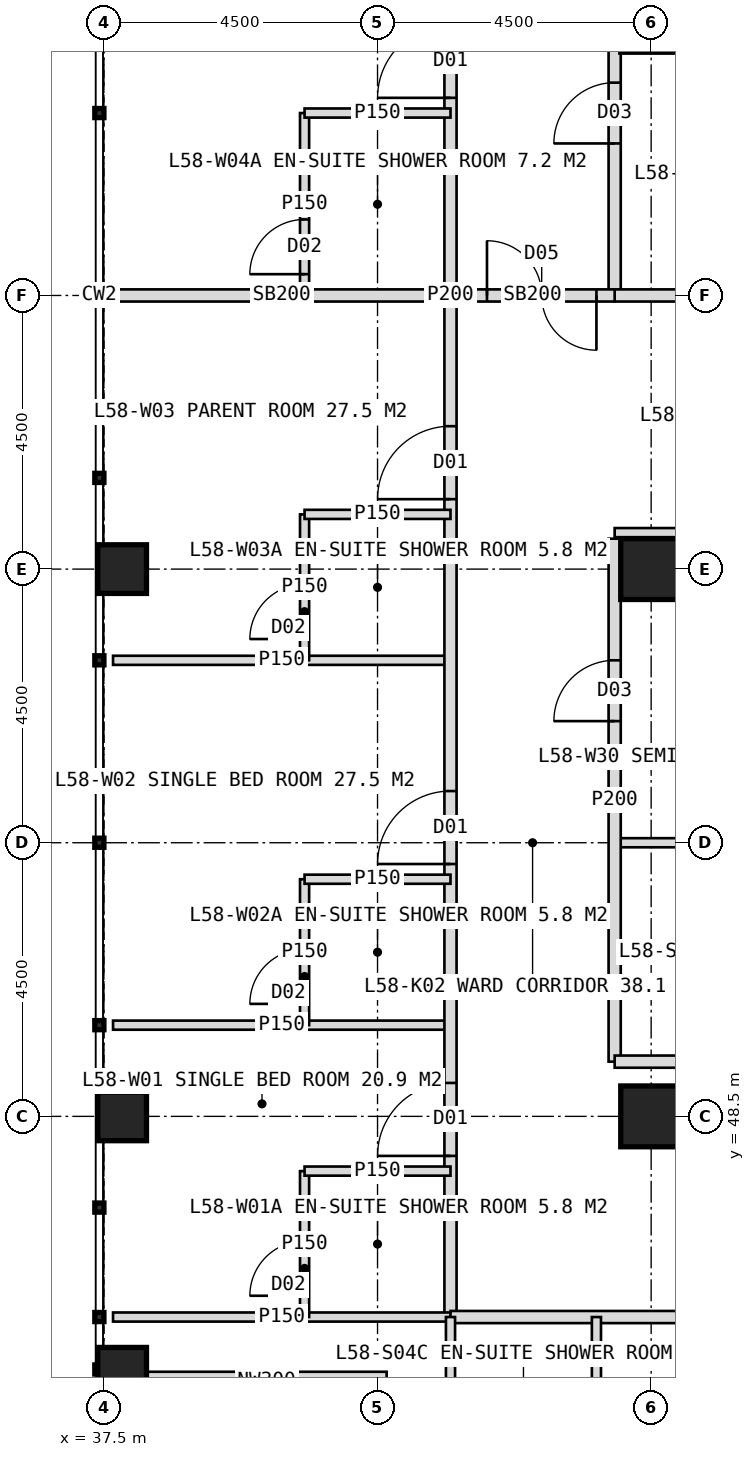
"""IFC4 building model, lengths in metres.
Left out: names, types, materials, properties, quantities, classifications, styles, units other than length and angle.
Written with IfcOpenShell. Run it as: python <this file> out.ifc"""

import sys

from ifc_helpers import new_model, si_unit, direction, frame, frame_2d, origin, origin_2d, place, context, subcontext, project, spatial, rectangle, hollow_rectangle, extrude, element, fill, save


model = new_model("IFC4")
c1 = context("Model", 3, precision=1e-05, world=origin(), true_north=direction((0.0, 1.0)))
c2 = subcontext(c1, "Body", "Model", "MODEL_VIEW")
j1 = project(units=[si_unit("LENGTHUNIT", "METRE"), si_unit("PLANEANGLEUNIT", "RADIAN")], contexts=[c1])
p1 = place(None, origin())
s1 = spatial("IfcSite", under=j1, at=p1, CompositionType="ELEMENT")
p2 = place(p1, origin())
s2 = spatial("IfcBuilding", under=s1, at=p2, CompositionType="ELEMENT")
p3 = place(p2, frame((0.0, 0.0, 241.0)))
s3 = spatial("IfcBuildingStorey", under=s2, at=p3, CompositionType="ELEMENT", Elevation=241.0)
for number, where, z_axis, x_axis in (
    (1, (46.5, 48.5, 0.0), (0.0, 0.0, 1.0), (1.0, 0.0, 0.0)),
    (2, (46.5, 57.5, 0.0), (0.0, 0.0, 1.0), (1.0, 0.0, 0.0)),
):
    element("IfcColumn", number, at=place(p3, frame(where, z_axis=z_axis, x_axis=x_axis)), inside=s3, PredefinedType="COLUMN", context=c2, shape_type="SweptSolid", body=[
        extrude(hollow_rectangle(XDim=1.0, YDim=1.0, WallThickness=0.1, at=origin_2d()), origin(), (0.0, 0.0, 1.0), 4.0),
    ])
for number, where, z_axis, x_axis in (
    (3, (37.8, 44.3, 0.0), (0.0, 0.0, 1.0), (1.0, 0.0, 0.0)),
    (4, (37.8, 48.5, 0.0), (0.0, 0.0, 1.0), (1.0, 0.0, 0.0)),
    (5, (37.8, 57.5, 0.0), (0.0, 0.0, 1.0), (1.0, 0.0, 0.0)),
):
    element("IfcColumn", number, at=place(p3, frame(where, z_axis=z_axis, x_axis=x_axis)), inside=s3, PredefinedType="COLUMN", context=c2, shape_type="SweptSolid", body=[
        extrude(hollow_rectangle(XDim=0.8, YDim=0.8, WallThickness=0.08, at=origin_2d()), origin(), (0.0, 0.0, 1.0), 4.0),
    ])
p4 = place(p3, frame((42.15, 44.15, 0.0), z_axis=(0.0, 0.0, 1.0), x_axis=(-1.0, 0.0, 0.0)))
e6 = element("IfcWall", 6, at=p4, inside=s3, PredefinedType="ELEMENTEDWALL", context=c2, shape_type="SweptSolid", body=[
    extrude(rectangle(XDim=3.95, YDim=0.3, at=frame_2d((1.975, 0.0))), origin(), (0.0, 0.0, 1.0), 2.95),
])
for number, where, z_axis, x_axis in (
    (7, (43.2, 50.0, 0.0), (0.0, 0.0, 1.0), (-1.0, 0.0, 0.0)),
    (8, (43.2, 56.0, 0.0), (0.0, 0.0, 1.0), (-1.0, 0.0, 0.0)),
):
    element("IfcWall", number, at=place(p3, frame(where, z_axis=z_axis, x_axis=x_axis)), inside=s3, PredefinedType="PARTITIONING", context=c2, shape_type="SweptSolid", body=[
        extrude(rectangle(XDim=5.55, YDim=0.15, at=frame_2d((2.775, 0.0))), origin(), (0.0, 0.0, 1.0), 3.75),
    ])
p5 = place(p3, frame((43.2, 62.0, 0.0), z_axis=(0.0, 0.0, 1.0), x_axis=(-1.0, 0.0, 0.0)))
e9 = element("IfcWall", 9, at=p5, inside=s3, PredefinedType="SOLIDWALL", context=c2, shape_type="SweptSolid", body=[
    extrude(rectangle(XDim=5.55, YDim=0.2, at=frame_2d((2.775, 0.0))), origin(), (0.0, 0.0, 1.0), 2.95),
])
p6 = place(p3, frame((43.2, 45.2, 0.0), z_axis=(0.0, 0.0, 1.0), x_axis=(0.0, 1.0, 0.0)))
e10 = element("IfcWall", 10, at=p6, inside=s3, PredefinedType="PARTITIONING", context=c2, shape_type="SweptSolid", body=[
    extrude(rectangle(XDim=33.6, YDim=0.2, at=frame_2d((16.8, 0.0))), origin(), (0.0, 0.0, 1.0), 3.75),
])
p7 = place(p6, frame((2.65, 0.0, 0.0)))
e11 = element("IfcOpeningElement", 11, at=p7, cuts=e10, PredefinedType="OPENING", context=c2, shape_type="SweptSolid", body=[
    extrude(rectangle(XDim=1.2, YDim=2.2, at=frame_2d((0.6, 1.1))), frame((0.0, 0.11, 0.0), z_axis=(0.0, -1.0, 0.0), x_axis=(1.0, 0.0, 0.0)), (0.0, 0.0, 1.0), 0.22),
])
p8 = place(p6, frame((7.45, 0.0, 0.0)))
e12 = element("IfcOpeningElement", 12, at=p8, cuts=e10, PredefinedType="OPENING", context=c2, shape_type="SweptSolid", body=[
    extrude(rectangle(XDim=1.2, YDim=2.2, at=frame_2d((0.6, 1.1))), frame((0.0, 0.11, 0.0), z_axis=(0.0, -1.0, 0.0), x_axis=(1.0, 0.0, 0.0)), (0.0, 0.0, 1.0), 0.22),
])
p9 = place(p6, frame((13.45, 0.0, 0.0)))
e13 = element("IfcOpeningElement", 13, at=p9, cuts=e10, PredefinedType="OPENING", context=c2, shape_type="SweptSolid", body=[
    extrude(rectangle(XDim=1.2, YDim=2.2, at=frame_2d((0.6, 1.1))), frame((0.0, 0.11, 0.0), z_axis=(0.0, -1.0, 0.0), x_axis=(1.0, 0.0, 0.0)), (0.0, 0.0, 1.0), 0.22),
])
p10 = place(p6, frame((20.05, 0.0, 0.0)))
e14 = element("IfcOpeningElement", 14, at=p10, cuts=e10, PredefinedType="OPENING", context=c2, shape_type="SweptSolid", body=[
    extrude(rectangle(XDim=1.2, YDim=2.2, at=frame_2d((0.6, 1.1))), frame((0.0, 0.11, 0.0), z_axis=(0.0, -1.0, 0.0), x_axis=(1.0, 0.0, 0.0)), (0.0, 0.0, 1.0), 0.22),
])
p11 = place(p6, frame((29.05, 0.0, 0.0)))
e15 = element("IfcOpeningElement", 15, at=p11, cuts=e10, PredefinedType="OPENING", context=c2, shape_type="SweptSolid", body=[
    extrude(rectangle(XDim=1.2, YDim=2.2, at=frame_2d((0.6, 1.1))), frame((0.0, 0.11, 0.0), z_axis=(0.0, -1.0, 0.0), x_axis=(1.0, 0.0, 0.0)), (0.0, 0.0, 1.0), 0.22),
])
p12 = place(p3, frame((43.2, 45.2, 0.0), z_axis=(0.0, 0.0, 1.0), x_axis=(-1.0, 0.0, 0.0)))
e16 = element("IfcWall", 16, at=p12, inside=s3, PredefinedType="PARTITIONING", context=c2, shape_type="SweptSolid", body=[
    extrude(rectangle(XDim=5.55, YDim=0.15, at=frame_2d((2.775, 0.0))), origin(), (0.0, 0.0, 1.0), 3.75),
])
p13 = place(p3, frame((40.8, 45.2, 0.0), z_axis=(0.0, 0.0, 1.0), x_axis=(0.0, 1.0, 0.0)))
e17 = element("IfcWall", 17, at=p13, inside=s3, PredefinedType="PARTITIONING", context=c2, shape_type="SweptSolid", body=[
    extrude(rectangle(XDim=2.4, YDim=0.15, at=frame_2d((1.2, 0.0))), origin(), (0.0, 0.0, 1.0), 3.75),
])
p14 = place(p13, frame((0.35, 0.0, 0.0)))
e18 = element("IfcOpeningElement", 18, at=p14, cuts=e17, PredefinedType="OPENING", context=c2, shape_type="SweptSolid", body=[
    extrude(rectangle(XDim=0.9, YDim=2.1, at=frame_2d((0.45, 1.05))), frame((0.0, 0.085, 0.0), z_axis=(0.0, -1.0, 0.0), x_axis=(1.0, 0.0, 0.0)), (0.0, 0.0, 1.0), 0.17),
])
p15 = place(p3, frame((43.2, 47.6, 0.0), z_axis=(0.0, 0.0, 1.0), x_axis=(-1.0, 0.0, 0.0)))
e19 = element("IfcWall", 19, at=p15, inside=s3, PredefinedType="PARTITIONING", context=c2, shape_type="SweptSolid", body=[
    extrude(rectangle(XDim=2.4, YDim=0.15, at=frame_2d((1.2, 0.0))), origin(), (0.0, 0.0, 1.0), 3.75),
])
p16 = place(p3, frame((40.8, 50.0, 0.0), z_axis=(0.0, 0.0, 1.0), x_axis=(0.0, 1.0, 0.0)))
e20 = element("IfcWall", 20, at=p16, inside=s3, PredefinedType="PARTITIONING", context=c2, shape_type="SweptSolid", body=[
    extrude(rectangle(XDim=2.4, YDim=0.15, at=frame_2d((1.2, 0.0))), origin(), (0.0, 0.0, 1.0), 3.75),
])
p17 = place(p16, frame((0.35, 0.0, 0.0)))
e21 = element("IfcOpeningElement", 21, at=p17, cuts=e20, PredefinedType="OPENING", context=c2, shape_type="SweptSolid", body=[
    extrude(rectangle(XDim=0.9, YDim=2.1, at=frame_2d((0.45, 1.05))), frame((0.0, 0.085, 0.0), z_axis=(0.0, -1.0, 0.0), x_axis=(1.0, 0.0, 0.0)), (0.0, 0.0, 1.0), 0.17),
])
p18 = place(p3, frame((43.2, 52.4, 0.0), z_axis=(0.0, 0.0, 1.0), x_axis=(-1.0, 0.0, 0.0)))
e22 = element("IfcWall", 22, at=p18, inside=s3, PredefinedType="PARTITIONING", context=c2, shape_type="SweptSolid", body=[
    extrude(rectangle(XDim=2.4, YDim=0.15, at=frame_2d((1.2, 0.0))), origin(), (0.0, 0.0, 1.0), 3.75),
])
p19 = place(p3, frame((40.8, 56.0, 0.0), z_axis=(0.0, 0.0, 1.0), x_axis=(0.0, 1.0, 0.0)))
e23 = element("IfcWall", 23, at=p19, inside=s3, PredefinedType="PARTITIONING", context=c2, shape_type="SweptSolid", body=[
    extrude(rectangle(XDim=2.4, YDim=0.15, at=frame_2d((1.2, 0.0))), origin(), (0.0, 0.0, 1.0), 3.75),
])
p20 = place(p19, frame((0.35, 0.0, 0.0)))
e24 = element("IfcOpeningElement", 24, at=p20, cuts=e23, PredefinedType="OPENING", context=c2, shape_type="SweptSolid", body=[
    extrude(rectangle(XDim=0.9, YDim=2.1, at=frame_2d((0.45, 1.05))), frame((0.0, 0.085, 0.0), z_axis=(0.0, -1.0, 0.0), x_axis=(1.0, 0.0, 0.0)), (0.0, 0.0, 1.0), 0.17),
])
p21 = place(p3, frame((43.2, 58.4, 0.0), z_axis=(0.0, 0.0, 1.0), x_axis=(-1.0, 0.0, 0.0)))
e25 = element("IfcWall", 25, at=p21, inside=s3, PredefinedType="PARTITIONING", context=c2, shape_type="SweptSolid", body=[
    extrude(rectangle(XDim=2.4, YDim=0.15, at=frame_2d((1.2, 0.0))), origin(), (0.0, 0.0, 1.0), 3.75),
])
p22 = place(p3, frame((40.8, 62.0, 0.0), z_axis=(0.0, 0.0, 1.0), x_axis=(0.0, 1.0, 0.0)))
e26 = element("IfcWall", 26, at=p22, inside=s3, PredefinedType="PARTITIONING", context=c2, shape_type="SweptSolid", body=[
    extrude(rectangle(XDim=3.0, YDim=0.15, at=frame_2d((1.5, 0.0))), origin(), (0.0, 0.0, 1.0), 3.75),
])
p23 = place(p22, frame((0.35, 0.0, 0.0)))
e27 = element("IfcOpeningElement", 27, at=p23, cuts=e26, PredefinedType="OPENING", context=c2, shape_type="SweptSolid", body=[
    extrude(rectangle(XDim=0.9, YDim=2.1, at=frame_2d((0.45, 1.05))), frame((0.0, 0.085, 0.0), z_axis=(0.0, -1.0, 0.0), x_axis=(1.0, 0.0, 0.0)), (0.0, 0.0, 1.0), 0.17),
])
p24 = place(p3, frame((43.2, 65.0, 0.0), z_axis=(0.0, 0.0, 1.0), x_axis=(-1.0, 0.0, 0.0)))
e28 = element("IfcWall", 28, at=p24, inside=s3, PredefinedType="PARTITIONING", context=c2, shape_type="SweptSolid", body=[
    extrude(rectangle(XDim=2.4, YDim=0.15, at=frame_2d((1.2, 0.0))), origin(), (0.0, 0.0, 1.0), 3.75),
])
p25 = place(p3, frame((51.0, 53.0, 0.0), z_axis=(0.0, 0.0, 1.0), x_axis=(-1.0, 0.0, 0.0)))
e29 = element("IfcWall", 29, at=p25, inside=s3, PredefinedType="PARTITIONING", context=c2, shape_type="SweptSolid", body=[
    extrude(rectangle(XDim=5.1, YDim=0.15, at=frame_2d((2.55, 0.0))), origin(), (0.0, 0.0, 1.0), 3.75),
])
p26 = place(p3, frame((45.9, 49.4, 0.0), z_axis=(0.0, 0.0, 1.0), x_axis=(0.0, 1.0, 0.0)))
e30 = element("IfcWall", 30, at=p26, inside=s3, PredefinedType="PARTITIONING", context=c2, shape_type="SweptSolid", body=[
    extrude(rectangle(XDim=8.6, YDim=0.2, at=frame_2d((4.3, 0.0))), origin(), (0.0, 0.0, 1.0), 3.75),
])
p27 = place(p26, frame((5.6, 0.0, 0.0)))
e31 = element("IfcOpeningElement", 31, at=p27, cuts=e30, PredefinedType="OPENING", context=c2, shape_type="SweptSolid", body=[
    extrude(rectangle(XDim=1.0, YDim=2.1, at=frame_2d((0.5, 1.05))), frame((0.0, 0.11, 0.0), z_axis=(0.0, -1.0, 0.0), x_axis=(1.0, 0.0, 0.0)), (0.0, 0.0, 1.0), 0.22),
])
p28 = place(p3, frame((45.9, 62.0, 0.0), z_axis=(0.0, 0.0, 1.0), x_axis=(0.0, 1.0, 0.0)))
e32 = element("IfcWall", 32, at=p28, inside=s3, PredefinedType="PARTITIONING", context=c2, shape_type="SweptSolid", body=[
    extrude(rectangle(XDim=14.1, YDim=0.2, at=frame_2d((7.05, 0.0))), origin(), (0.0, 0.0, 1.0), 3.75),
])
p29 = place(p28, frame((2.5, 0.0, 0.0)))
e33 = element("IfcOpeningElement", 33, at=p29, cuts=e32, PredefinedType="OPENING", context=c2, shape_type="SweptSolid", body=[
    extrude(rectangle(XDim=1.0, YDim=2.1, at=frame_2d((0.5, 1.05))), frame((0.0, 0.11, 0.0), z_axis=(0.0, -1.0, 0.0), x_axis=(1.0, 0.0, 0.0)), (0.0, 0.0, 1.0), 0.22),
])
p30 = place(p28, frame((7.0, 0.0, 0.0)))
e34 = element("IfcOpeningElement", 34, at=p30, cuts=e32, PredefinedType="OPENING", context=c2, shape_type="SweptSolid", body=[
    extrude(rectangle(XDim=1.0, YDim=2.1, at=frame_2d((0.5, 1.05))), frame((0.0, 0.11, 0.0), z_axis=(0.0, -1.0, 0.0), x_axis=(1.0, 0.0, 0.0)), (0.0, 0.0, 1.0), 0.22),
])
p31 = place(p28, frame((11.05, 0.0, 0.0)))
e35 = element("IfcOpeningElement", 35, at=p31, cuts=e32, PredefinedType="OPENING", context=c2, shape_type="SweptSolid", body=[
    extrude(rectangle(XDim=1.0, YDim=2.1, at=frame_2d((0.5, 1.05))), frame((0.0, 0.11, 0.0), z_axis=(0.0, -1.0, 0.0), x_axis=(1.0, 0.0, 0.0)), (0.0, 0.0, 1.0), 0.22),
])
p32 = place(p3, frame((51.0, 58.1, 0.0), z_axis=(0.0, 0.0, 1.0), x_axis=(-1.0, 0.0, 0.0)))
e36 = element("IfcWall", 36, at=p32, inside=s3, PredefinedType="PARTITIONING", context=c2, shape_type="SweptSolid", body=[
    extrude(rectangle(XDim=5.1, YDim=0.15, at=frame_2d((2.55, 0.0))), origin(), (0.0, 0.0, 1.0), 3.75),
])
p33 = place(p32, frame((0.6, 0.0, 0.0)))
e37 = element("IfcOpeningElement", 37, at=p33, cuts=e36, PredefinedType="OPENING", context=c2, shape_type="SweptSolid", body=[
    extrude(rectangle(XDim=0.9, YDim=2.1, at=frame_2d((0.45, 1.05))), frame((0.0, 0.085, 0.0), z_axis=(0.0, -1.0, 0.0), x_axis=(1.0, 0.0, 0.0)), (0.0, 0.0, 1.0), 0.17),
])
p34 = place(p3, frame((51.0, 62.0, 0.0), z_axis=(0.0, 0.0, 1.0), x_axis=(-1.0, 0.0, 0.0)))
e38 = element("IfcWall", 38, at=p34, inside=s3, PredefinedType="SOLIDWALL", context=c2, shape_type="SweptSolid", body=[
    extrude(rectangle(XDim=5.1, YDim=0.2, at=frame_2d((2.55, 0.0))), origin(), (0.0, 0.0, 1.0), 2.95),
])
p35 = place(p3, frame((76.8, 45.2, 0.0), z_axis=(0.0, 0.0, 1.0), x_axis=(-1.0, 0.0, 0.0)))
e39 = element("IfcWall", 39, at=p35, inside=s3, PredefinedType="PARTITIONING", context=c2, shape_type="SweptSolid", body=[
    extrude(rectangle(XDim=33.6, YDim=0.2, at=frame_2d((16.8, 0.0))), origin(), (0.0, 0.0, 1.0), 3.75),
])
p36 = place(p35, frame((3.25, 0.0, 0.0)))
e40 = element("IfcOpeningElement", 40, at=p36, cuts=e39, PredefinedType="OPENING", context=c2, shape_type="SweptSolid", body=[
    extrude(rectangle(XDim=1.2, YDim=2.2, at=frame_2d((0.6, 1.1))), frame((0.0, 0.11, 0.0), z_axis=(0.0, -1.0, 0.0), x_axis=(1.0, 0.0, 0.0)), (0.0, 0.0, 1.0), 0.22),
])
p37 = place(p35, frame((11.05, 0.0, 0.0)))
e41 = element("IfcOpeningElement", 41, at=p37, cuts=e39, PredefinedType="OPENING", context=c2, shape_type="SweptSolid", body=[
    extrude(rectangle(XDim=1.2, YDim=2.2, at=frame_2d((0.6, 1.1))), frame((0.0, 0.11, 0.0), z_axis=(0.0, -1.0, 0.0), x_axis=(1.0, 0.0, 0.0)), (0.0, 0.0, 1.0), 0.22),
])
p38 = place(p35, frame((19.45, 0.0, 0.0)))
e42 = element("IfcOpeningElement", 42, at=p38, cuts=e39, PredefinedType="OPENING", context=c2, shape_type="SweptSolid", body=[
    extrude(rectangle(XDim=1.2, YDim=2.2, at=frame_2d((0.6, 1.1))), frame((0.0, 0.11, 0.0), z_axis=(0.0, -1.0, 0.0), x_axis=(1.0, 0.0, 0.0)), (0.0, 0.0, 1.0), 0.22),
])
p39 = place(p35, frame((25.45, 0.0, 0.0)))
e43 = element("IfcOpeningElement", 43, at=p39, cuts=e39, PredefinedType="OPENING", context=c2, shape_type="SweptSolid", body=[
    extrude(rectangle(XDim=1.2, YDim=2.2, at=frame_2d((0.6, 1.1))), frame((0.0, 0.11, 0.0), z_axis=(0.0, -1.0, 0.0), x_axis=(1.0, 0.0, 0.0)), (0.0, 0.0, 1.0), 0.22),
])
for number, where, z_axis, x_axis in (
    (44, (45.6, 45.2, 0.0), (0.0, 0.0, 1.0), (0.0, -1.0, 0.0)),
    (45, (43.2, 45.2, 0.0), (0.0, 0.0, 1.0), (0.0, -1.0, 0.0)),
):
    element("IfcWall", number, at=place(p3, frame(where, z_axis=z_axis, x_axis=x_axis)), inside=s3, PredefinedType="PARTITIONING", context=c2, shape_type="SweptSolid", body=[
        extrude(rectangle(XDim=2.4, YDim=0.15, at=frame_2d((1.2, 0.0))), origin(), (0.0, 0.0, 1.0), 3.75),
    ])
p40 = place(p3, frame((57.75, 49.4, 0.0), z_axis=(0.0, 0.0, 1.0), x_axis=(-1.0, 0.0, 0.0)))
e46 = element("IfcWall", 46, at=p40, inside=s3, PredefinedType="PARTITIONING", context=c2, shape_type="SweptSolid", body=[
    extrude(rectangle(XDim=11.85, YDim=0.2, at=frame_2d((5.925, 0.0))), origin(), (0.0, 0.0, 1.0), 3.75),
])
p41 = place(p40, frame((0.325, 0.0, 0.0)))
e47 = element("IfcOpeningElement", 47, at=p41, cuts=e46, PredefinedType="OPENING", context=c2, shape_type="SweptSolid", body=[
    extrude(rectangle(XDim=1.0, YDim=2.1, at=frame_2d((0.5, 1.05))), frame((0.0, 0.11, 0.0), z_axis=(0.0, -1.0, 0.0), x_axis=(1.0, 0.0, 0.0)), (0.0, 0.0, 1.0), 0.22),
])
p42 = place(p40, frame((4.75, 0.0, 0.0)))
e48 = element("IfcOpeningElement", 48, at=p42, cuts=e46, PredefinedType="OPENING", context=c2, shape_type="SweptSolid", body=[
    extrude(rectangle(XDim=1.0, YDim=2.1, at=frame_2d((0.5, 1.05))), frame((0.0, 0.11, 0.0), z_axis=(0.0, -1.0, 0.0), x_axis=(1.0, 0.0, 0.0)), (0.0, 0.0, 1.0), 0.22),
])
p43 = place(p40, frame((8.8, 0.0, 0.0)))
e49 = element("IfcOpeningElement", 49, at=p43, cuts=e46, PredefinedType="OPENING", context=c2, shape_type="SweptSolid", body=[
    extrude(rectangle(XDim=1.0, YDim=2.1, at=frame_2d((0.5, 1.05))), frame((0.0, 0.11, 0.0), z_axis=(0.0, -1.0, 0.0), x_axis=(1.0, 0.0, 0.0)), (0.0, 0.0, 1.0), 0.22),
])
p44 = place(p3, frame((45.9, 62.0, 0.0), z_axis=(0.0, 0.0, 1.0), x_axis=(-1.0, 0.0, 0.0)))
e50 = element("IfcWall", 50, at=p44, inside=s3, PredefinedType="SOLIDWALL", context=c2, shape_type="SweptSolid", body=[
    extrude(rectangle(XDim=2.7, YDim=0.2, at=frame_2d((1.35, 0.0))), origin(), (0.0, 0.0, 1.0), 2.95),
])
p45 = place(p44, frame((0.3, 0.0, 0.0)))
e51 = element("IfcOpeningElement", 51, at=p45, cuts=e50, PredefinedType="OPENING", context=c2, shape_type="SweptSolid", body=[
    extrude(rectangle(XDim=1.8, YDim=2.2, at=frame_2d((0.9, 1.1))), frame((0.0, 0.11, 0.0), z_axis=(0.0, -1.0, 0.0), x_axis=(1.0, 0.0, 0.0)), (0.0, 0.0, 1.0), 0.22),
])
p46 = place(p7, origin())
e52 = element("IfcDoor", 52, at=p46, inside=s3, OperationType="SINGLE_SWING_LEFT", PredefinedType="DOOR", context=c2, shape_type="SweptSolid", body=[
    extrude(rectangle(XDim=1.2, YDim=2.2, at=frame_2d((0.6, 1.1))), frame((0.0, 0.025, 0.0), z_axis=(0.0, -1.0, 0.0), x_axis=(1.0, 0.0, 0.0)), (0.0, 0.0, 1.0), 0.05),
])
fill(e11, e52)
p47 = place(p14, origin())
e53 = element("IfcDoor", 53, at=p47, inside=s3, OperationType="SINGLE_SWING_LEFT", PredefinedType="DOOR", context=c2, shape_type="SweptSolid", body=[
    extrude(rectangle(XDim=0.9, YDim=2.1, at=frame_2d((0.45, 1.05))), frame((0.0, 0.025, 0.0), z_axis=(0.0, -1.0, 0.0), x_axis=(1.0, 0.0, 0.0)), (0.0, 0.0, 1.0), 0.05),
])
fill(e18, e53)
p48 = place(p8, origin())
e54 = element("IfcDoor", 54, at=p48, inside=s3, OperationType="SINGLE_SWING_LEFT", PredefinedType="DOOR", context=c2, shape_type="SweptSolid", body=[
    extrude(rectangle(XDim=1.2, YDim=2.2, at=frame_2d((0.6, 1.1))), frame((0.0, 0.025, 0.0), z_axis=(0.0, -1.0, 0.0), x_axis=(1.0, 0.0, 0.0)), (0.0, 0.0, 1.0), 0.05),
])
fill(e12, e54)
p49 = place(p17, origin())
e55 = element("IfcDoor", 55, at=p49, inside=s3, OperationType="SINGLE_SWING_LEFT", PredefinedType="DOOR", context=c2, shape_type="SweptSolid", body=[
    extrude(rectangle(XDim=0.9, YDim=2.1, at=frame_2d((0.45, 1.05))), frame((0.0, 0.025, 0.0), z_axis=(0.0, -1.0, 0.0), x_axis=(1.0, 0.0, 0.0)), (0.0, 0.0, 1.0), 0.05),
])
fill(e21, e55)
p50 = place(p9, origin())
e56 = element("IfcDoor", 56, at=p50, inside=s3, OperationType="SINGLE_SWING_LEFT", PredefinedType="DOOR", context=c2, shape_type="SweptSolid", body=[
    extrude(rectangle(XDim=1.2, YDim=2.2, at=frame_2d((0.6, 1.1))), frame((0.0, 0.025, 0.0), z_axis=(0.0, -1.0, 0.0), x_axis=(1.0, 0.0, 0.0)), (0.0, 0.0, 1.0), 0.05),
])
fill(e13, e56)
p51 = place(p20, origin())
e57 = element("IfcDoor", 57, at=p51, inside=s3, OperationType="SINGLE_SWING_LEFT", PredefinedType="DOOR", context=c2, shape_type="SweptSolid", body=[
    extrude(rectangle(XDim=0.9, YDim=2.1, at=frame_2d((0.45, 1.05))), frame((0.0, 0.025, 0.0), z_axis=(0.0, -1.0, 0.0), x_axis=(1.0, 0.0, 0.0)), (0.0, 0.0, 1.0), 0.05),
])
fill(e24, e57)
p52 = place(p10, origin())
e58 = element("IfcDoor", 58, at=p52, inside=s3, OperationType="SINGLE_SWING_LEFT", PredefinedType="DOOR", context=c2, shape_type="SweptSolid", body=[
    extrude(rectangle(XDim=1.2, YDim=2.2, at=frame_2d((0.6, 1.1))), frame((0.0, 0.025, 0.0), z_axis=(0.0, -1.0, 0.0), x_axis=(1.0, 0.0, 0.0)), (0.0, 0.0, 1.0), 0.05),
])
fill(e14, e58)
p53 = place(p23, origin())
e59 = element("IfcDoor", 59, at=p53, inside=s3, OperationType="SINGLE_SWING_LEFT", PredefinedType="DOOR", context=c2, shape_type="SweptSolid", body=[
    extrude(rectangle(XDim=0.9, YDim=2.1, at=frame_2d((0.45, 1.05))), frame((0.0, 0.025, 0.0), z_axis=(0.0, -1.0, 0.0), x_axis=(1.0, 0.0, 0.0)), (0.0, 0.0, 1.0), 0.05),
])
fill(e27, e59)
p54 = place(p27, origin())
e60 = element("IfcDoor", 60, at=p54, inside=s3, OperationType="SINGLE_SWING_LEFT", PredefinedType="DOOR", context=c2, shape_type="SweptSolid", body=[
    extrude(rectangle(XDim=1.0, YDim=2.1, at=frame_2d((0.5, 1.05))), frame((0.0, 0.025, 0.0), z_axis=(0.0, -1.0, 0.0), x_axis=(1.0, 0.0, 0.0)), (0.0, 0.0, 1.0), 0.05),
])
fill(e31, e60)
p55 = place(p29, origin())
e61 = element("IfcDoor", 61, at=p55, inside=s3, OperationType="SINGLE_SWING_LEFT", PredefinedType="DOOR", context=c2, shape_type="SweptSolid", body=[
    extrude(rectangle(XDim=1.0, YDim=2.1, at=frame_2d((0.5, 1.05))), frame((0.0, 0.025, 0.0), z_axis=(0.0, -1.0, 0.0), x_axis=(1.0, 0.0, 0.0)), (0.0, 0.0, 1.0), 0.05),
])
fill(e33, e61)
p56 = place(p45, origin())
e62 = element("IfcDoor", 62, at=p56, inside=s3, OperationType="DOUBLE_DOOR_DOUBLE_SWING", PredefinedType="DOOR", context=c2, shape_type="SweptSolid", body=[
    extrude(rectangle(XDim=1.8, YDim=2.2, at=frame_2d((0.9, 1.1))), frame((0.0, 0.025, 0.0), z_axis=(0.0, -1.0, 0.0), x_axis=(1.0, 0.0, 0.0)), (0.0, 0.0, 1.0), 0.05),
])
fill(e51, e62)
save(model, sys.argv[1])
